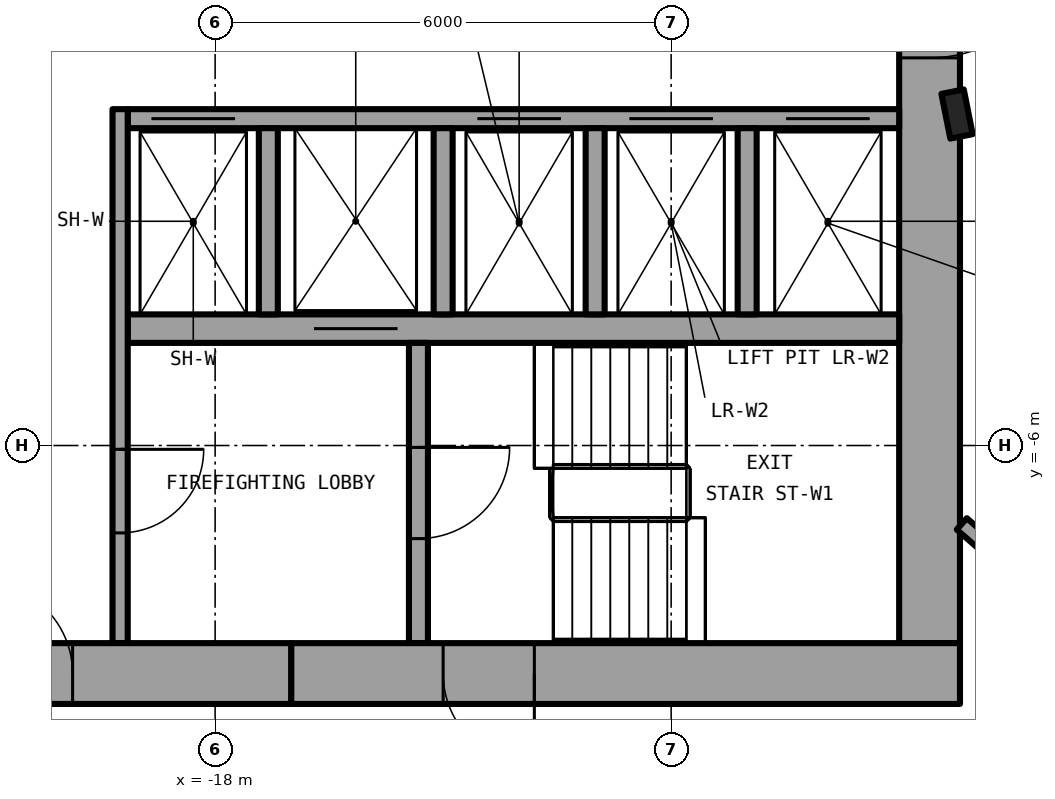
"""IFC4 building model, lengths in metres.
Left out: names, types, materials, properties, quantities, classifications, styles, units other than length and angle.
Written with IfcOpenShell. Run it as: python <this file> out.ifc"""

import sys

from ifc_helpers import new_model, si_unit, direction, frame, frame_2d, origin, origin_2d, place, context, subcontext, project, spatial, rectangle, i_section, extrude, element, fill, save


model = new_model("IFC4")
c1 = context("Model", 3, precision=1e-05, world=origin(), true_north=direction((0.0, 1.0)))
c2 = subcontext(c1, "Body", "Model", "MODEL_VIEW")
j1 = project(units=[si_unit("LENGTHUNIT", "METRE"), si_unit("PLANEANGLEUNIT", "RADIAN")], contexts=[c1])
p1 = place(None, origin())
s1 = spatial("IfcSite", under=j1, at=p1, CompositionType="ELEMENT")
p2 = place(p1, origin())
s2 = spatial("IfcBuilding", under=s1, at=p2, CompositionType="ELEMENT")
p3 = place(p2, origin())
s3 = spatial("IfcBuildingStorey", under=s2, at=p3, CompositionType="ELEMENT", Elevation=0.0)
p4 = place(p3, frame((-8.239, -1.639, -0.5), z_axis=(0.0, 0.0, 1.0), x_axis=(-0.980785280403, -0.195090322016, 0.0)))
e1 = element("IfcColumn", 1, at=p4, inside=s3, PredefinedType="COLUMN", context=c2, shape_type="SweptSolid", body=[
    extrude(i_section(OverallWidth=0.3, OverallDepth=0.6, WebThickness=0.015, FlangeThickness=0.03, FilletRadius=0.027, at=origin_2d()), origin(), (0.0, 0.0, 1.0), 5.9),
])
p5 = place(p3, frame((-8.6, 8.6, 0.0), z_axis=(0.0, 0.0, 1.0), x_axis=(0.0, -1.0, 0.0)))
e2 = element("IfcWall", 2, at=p5, inside=s3, PredefinedType="SHEAR", context=c2, shape_type="SweptSolid", body=[
    extrude(rectangle(XDim=17.2, YDim=0.8, at=frame_2d((8.6, 0.0))), origin(), (0.0, 0.0, 1.0), 5.4),
])
p6 = place(p5, frame((7.7, 0.0, 0.0)))
e3 = element("IfcOpeningElement", 3, at=p6, cuts=e2, PredefinedType="OPENING", context=c2, shape_type="SweptSolid", body=[
    extrude(rectangle(XDim=1.8, YDim=2.3, at=frame_2d((0.9, 1.15))), frame((0.0, 0.41, 0.0), z_axis=(0.0, -1.0, 0.0), x_axis=(1.0, 0.0, 0.0)), (0.0, 0.0, 1.0), 0.82),
])
p7 = place(p3, frame((-9.0, -1.7, 0.0), z_axis=(0.0, 0.0, 1.0), x_axis=(-1.0, 0.0, 0.0)))
e4 = element("IfcWall", 4, at=p7, inside=s3, PredefinedType="SHEAR", context=c2, shape_type="SweptSolid", body=[
    extrude(rectangle(XDim=10.15, YDim=0.25, at=frame_2d((5.075, 0.0))), origin(), (0.0, 0.0, 1.0), 5.4),
])
p8 = place(p7, frame((0.387, 0.0, 0.0)))
e5 = element("IfcOpeningElement", 5, at=p8, cuts=e4, PredefinedType="OPENING", context=c2, shape_type="SweptSolid", body=[
    extrude(rectangle(XDim=1.1, YDim=2.3, at=frame_2d((0.55, 1.15))), frame((0.0, 0.135, 0.0), z_axis=(0.0, -1.0, 0.0), x_axis=(1.0, 0.0, 0.0)), (0.0, 0.0, 1.0), 0.27),
])
p9 = place(p7, frame((2.45, 0.0, 0.0)))
e6 = element("IfcOpeningElement", 6, at=p9, cuts=e4, PredefinedType="OPENING", context=c2, shape_type="SweptSolid", body=[
    extrude(rectangle(XDim=1.1, YDim=2.3, at=frame_2d((0.55, 1.15))), frame((0.0, 0.135, 0.0), z_axis=(0.0, -1.0, 0.0), x_axis=(1.0, 0.0, 0.0)), (0.0, 0.0, 1.0), 0.27),
])
p10 = place(p7, frame((4.45, 0.0, 0.0)))
e7 = element("IfcOpeningElement", 7, at=p10, cuts=e4, PredefinedType="OPENING", context=c2, shape_type="SweptSolid", body=[
    extrude(rectangle(XDim=1.1, YDim=2.3, at=frame_2d((0.55, 1.15))), frame((0.0, 0.135, 0.0), z_axis=(0.0, -1.0, 0.0), x_axis=(1.0, 0.0, 0.0)), (0.0, 0.0, 1.0), 0.27),
])
p11 = place(p7, frame((8.738, 0.0, 0.0)))
e8 = element("IfcOpeningElement", 8, at=p11, cuts=e4, PredefinedType="OPENING", context=c2, shape_type="SweptSolid", body=[
    extrude(rectangle(XDim=1.1, YDim=2.3, at=frame_2d((0.55, 1.15))), frame((0.0, 0.135, 0.0), z_axis=(0.0, -1.0, 0.0), x_axis=(1.0, 0.0, 0.0)), (0.0, 0.0, 1.0), 0.27),
])
p12 = place(p3, frame((-9.0, -4.462, 0.0), z_axis=(0.0, 0.0, 1.0), x_axis=(-1.0, 0.0, 0.0)))
e9 = element("IfcWall", 9, at=p12, inside=s3, PredefinedType="SHEAR", context=c2, shape_type="SweptSolid", body=[
    extrude(rectangle(XDim=10.15, YDim=0.375, at=frame_2d((5.075, 0.0))), origin(), (0.0, 0.0, 1.0), 5.4),
])
p13 = place(p12, frame((6.6, 0.0, 0.0)))
e10 = element("IfcOpeningElement", 10, at=p13, cuts=e9, PredefinedType="OPENING", context=c2, shape_type="SweptSolid", body=[
    extrude(rectangle(XDim=1.1, YDim=2.3, at=frame_2d((0.55, 1.15))), frame((0.0, 0.198, 0.0), z_axis=(0.0, -1.0, 0.0), x_axis=(1.0, 0.0, 0.0)), (0.0, 0.0, 1.0), 0.395),
])
p14 = place(p3, frame((-15.325, -4.65, 0.0), z_axis=(0.0, 0.0, 1.0), x_axis=(0.0, -1.0, 0.0)))
e11 = element("IfcWall", 11, at=p14, inside=s3, PredefinedType="SHEAR", context=c2, shape_type="SweptSolid", body=[
    extrude(rectangle(XDim=3.95, YDim=0.25, at=frame_2d((1.975, 0.0))), origin(), (0.0, 0.0, 1.0), 5.4),
])
p15 = place(p14, frame((1.375, 0.0, 0.0)))
e12 = element("IfcOpeningElement", 12, at=p15, cuts=e11, PredefinedType="OPENING", context=c2, shape_type="SweptSolid", body=[
    extrude(rectangle(XDim=1.2, YDim=2.3, at=frame_2d((0.6, 1.15))), frame((0.0, 0.135, 0.0), z_axis=(0.0, -1.0, 0.0), x_axis=(1.0, 0.0, 0.0)), (0.0, 0.0, 1.0), 0.27),
])
for number, where, z_axis, x_axis in (
    (13, (-15.0, -1.825, 0.0), (0.0, 0.0, 1.0), (0.0, -1.0, 0.0)),
    (14, (-17.3, -1.825, 0.0), (0.0, 0.0, 1.0), (0.0, -1.0, 0.0)),
):
    element("IfcWall", number, at=place(p3, frame(where, z_axis=z_axis, x_axis=x_axis)), inside=s3, PredefinedType="SOLIDWALL", context=c2, shape_type="SweptSolid", body=[
        extrude(rectangle(XDim=2.45, YDim=0.25, at=frame_2d((1.225, 0.0))), origin(), (0.0, 0.0, 1.0), 4.95),
    ])
p16 = place(p3, frame((-19.25, -1.575, 0.0), z_axis=(0.0, 0.0, 1.0), x_axis=(0.0, -1.0, 0.0)))
e15 = element("IfcWall", 15, at=p16, inside=s3, PredefinedType="SOLIDWALL", context=c2, shape_type="SweptSolid", body=[
    extrude(rectangle(XDim=7.025, YDim=0.2, at=frame_2d((3.513, 0.0))), origin(), (0.0, 0.0, 1.0), 4.95),
])
p17 = place(p16, frame((4.475, 0.0, 0.0)))
e16 = element("IfcOpeningElement", 16, at=p17, cuts=e15, PredefinedType="OPENING", context=c2, shape_type="SweptSolid", body=[
    extrude(rectangle(XDim=1.1, YDim=2.3, at=frame_2d((0.55, 1.15))), frame((0.0, 0.11, 0.0), z_axis=(0.0, -1.0, 0.0), x_axis=(1.0, 0.0, 0.0)), (0.0, 0.0, 1.0), 0.22),
])
for number, where, z_axis, x_axis in (
    (17, (-11.0, -1.825, 0.0), (0.0, 0.0, 1.0), (0.0, -1.0, 0.0)),
    (18, (-13.0, -1.825, 0.0), (0.0, 0.0, 1.0), (0.0, -1.0, 0.0)),
):
    element("IfcWall", number, at=place(p3, frame(where, z_axis=z_axis, x_axis=x_axis)), inside=s3, PredefinedType="SOLIDWALL", context=c2, shape_type="SweptSolid", body=[
        extrude(rectangle(XDim=2.45, YDim=0.25, at=frame_2d((1.225, 0.0))), origin(), (0.0, 0.0, 1.0), 4.95),
    ])
p18 = place(p3, frame((-8.2, -9.0, 0.0), z_axis=(0.0, 0.0, 1.0), x_axis=(-1.0, 0.0, 0.0)))
e19 = element("IfcWall", 19, at=p18, inside=s3, PredefinedType="SHEAR", context=c2, shape_type="SweptSolid", body=[
    extrude(rectangle(XDim=8.8, YDim=0.8, at=frame_2d((4.4, 0.0))), origin(), (0.0, 0.0, 1.0), 5.4),
])
p19 = place(p18, frame((5.6, 0.0, 0.0)))
e20 = element("IfcOpeningElement", 20, at=p19, cuts=e19, PredefinedType="OPENING", context=c2, shape_type="SweptSolid", body=[
    extrude(rectangle(XDim=1.2, YDim=2.3, at=frame_2d((0.6, 1.15))), frame((0.0, 0.41, 0.0), z_axis=(0.0, -1.0, 0.0), x_axis=(1.0, 0.0, 0.0)), (0.0, 0.0, 1.0), 0.82),
])
p20 = place(p3, frame((-22.4, -9.0, 0.0), z_axis=(0.0, 0.0, 1.0), x_axis=(1.0, 0.0, 0.0)))
e21 = element("IfcWall", 21, at=p20, inside=s3, PredefinedType="SHEAR", context=c2, shape_type="SweptSolid", body=[
    extrude(rectangle(XDim=5.4, YDim=0.8, at=frame_2d((2.7, 0.0))), origin(), (0.0, 0.0, 1.0), 5.4),
])
p21 = place(p20, frame((1.325, 0.0, 0.0)))
e22 = element("IfcOpeningElement", 22, at=p21, cuts=e21, PredefinedType="OPENING", context=c2, shape_type="SweptSolid", body=[
    extrude(rectangle(XDim=1.2, YDim=2.3, at=frame_2d((0.6, 1.15))), frame((0.0, 0.41, 0.0), z_axis=(0.0, -1.0, 0.0), x_axis=(1.0, 0.0, 0.0)), (0.0, 0.0, 1.0), 0.82),
])
p22 = place(p3, frame((-8.176, -7.031, 0.0), z_axis=(0.0, 0.0, 1.0), x_axis=(0.751755271413, -0.659442197544, 0.0)))
e23 = element("IfcWall", 23, at=p22, inside=s3, PredefinedType="PARTITIONING", context=c2, shape_type="SweptSolid", body=[
    extrude(rectangle(XDim=2.211, YDim=0.2, at=frame_2d((1.105, 0.0))), origin(), (0.0, 0.0, 1.0), 4.95),
])
p23 = place(p8, origin())
e24 = element("IfcDoor", 24, at=p23, inside=s3, OperationType="DOUBLE_DOOR_SLIDING", PredefinedType="DOOR", context=c2, shape_type="SweptSolid", body=[
    extrude(rectangle(XDim=1.1, YDim=2.3, at=frame_2d((0.55, 1.15))), frame((0.0, 0.025, 0.0), z_axis=(0.0, -1.0, 0.0), x_axis=(1.0, 0.0, 0.0)), (0.0, 0.0, 1.0), 0.05),
])
fill(e5, e24)
p24 = place(p9, origin())
e25 = element("IfcDoor", 25, at=p24, inside=s3, OperationType="DOUBLE_DOOR_SLIDING", PredefinedType="DOOR", context=c2, shape_type="SweptSolid", body=[
    extrude(rectangle(XDim=1.1, YDim=2.3, at=frame_2d((0.55, 1.15))), frame((0.0, 0.025, 0.0), z_axis=(0.0, -1.0, 0.0), x_axis=(1.0, 0.0, 0.0)), (0.0, 0.0, 1.0), 0.05),
])
fill(e6, e25)
p25 = place(p10, origin())
e26 = element("IfcDoor", 26, at=p25, inside=s3, OperationType="DOUBLE_DOOR_SLIDING", PredefinedType="DOOR", context=c2, shape_type="SweptSolid", body=[
    extrude(rectangle(XDim=1.1, YDim=2.3, at=frame_2d((0.55, 1.15))), frame((0.0, 0.025, 0.0), z_axis=(0.0, -1.0, 0.0), x_axis=(1.0, 0.0, 0.0)), (0.0, 0.0, 1.0), 0.05),
])
fill(e7, e26)
p26 = place(p13, origin())
e27 = element("IfcDoor", 27, at=p26, inside=s3, OperationType="DOUBLE_DOOR_SLIDING", PredefinedType="DOOR", context=c2, shape_type="SweptSolid", body=[
    extrude(rectangle(XDim=1.1, YDim=2.3, at=frame_2d((0.55, 1.15))), frame((0.0, 0.025, 0.0), z_axis=(0.0, -1.0, 0.0), x_axis=(1.0, 0.0, 0.0)), (0.0, 0.0, 1.0), 0.05),
])
fill(e10, e27)
p27 = place(p11, origin())
e28 = element("IfcDoor", 28, at=p27, inside=s3, OperationType="DOUBLE_DOOR_SLIDING", PredefinedType="DOOR", context=c2, shape_type="SweptSolid", body=[
    extrude(rectangle(XDim=1.1, YDim=2.3, at=frame_2d((0.55, 1.15))), frame((0.0, 0.025, 0.0), z_axis=(0.0, -1.0, 0.0), x_axis=(1.0, 0.0, 0.0)), (0.0, 0.0, 1.0), 0.05),
])
fill(e8, e28)
p28 = place(p15, origin())
e29 = element("IfcDoor", 29, at=p28, inside=s3, OperationType="SINGLE_SWING_LEFT", PredefinedType="DOOR", context=c2, shape_type="SweptSolid", body=[
    extrude(rectangle(XDim=1.2, YDim=2.3, at=frame_2d((0.6, 1.15))), frame((0.0, 0.025, 0.0), z_axis=(0.0, -1.0, 0.0), x_axis=(1.0, 0.0, 0.0)), (0.0, 0.0, 1.0), 0.05),
])
fill(e12, e29)
p29 = place(p17, origin())
e30 = element("IfcDoor", 30, at=p29, inside=s3, OperationType="SINGLE_SWING_LEFT", PredefinedType="DOOR", context=c2, shape_type="SweptSolid", body=[
    extrude(rectangle(XDim=1.1, YDim=2.3, at=frame_2d((0.55, 1.15))), frame((0.0, 0.025, 0.0), z_axis=(0.0, -1.0, 0.0), x_axis=(1.0, 0.0, 0.0)), (0.0, 0.0, 1.0), 0.05),
])
fill(e16, e30)
p30 = place(p21, origin())
e31 = element("IfcDoor", 31, at=p30, inside=s3, OperationType="SINGLE_SWING_RIGHT", PredefinedType="DOOR", context=c2, shape_type="SweptSolid", body=[
    extrude(rectangle(XDim=1.2, YDim=2.3, at=frame_2d((0.6, 1.15))), frame((0.0, 0.025, 0.0), z_axis=(0.0, -1.0, 0.0), x_axis=(1.0, 0.0, 0.0)), (0.0, 0.0, 1.0), 0.05),
])
fill(e22, e31)
p31 = place(p6, origin())
e32 = element("IfcDoor", 32, at=p31, inside=s3, OperationType="SINGLE_SWING_LEFT", PredefinedType="DOOR", context=c2, shape_type="SweptSolid", body=[
    extrude(rectangle(XDim=1.8, YDim=2.3, at=frame_2d((0.9, 1.15))), frame((0.0, 0.025, 0.0), z_axis=(0.0, -1.0, 0.0), x_axis=(1.0, 0.0, 0.0)), (0.0, 0.0, 1.0), 0.05),
])
fill(e3, e32)
p32 = place(p19, origin())
e33 = element("IfcDoor", 33, at=p32, inside=s3, OperationType="SINGLE_SWING_LEFT", PredefinedType="DOOR", context=c2, shape_type="SweptSolid", body=[
    extrude(rectangle(XDim=1.2, YDim=2.3, at=frame_2d((0.6, 1.15))), frame((0.0, 0.025, 0.0), z_axis=(0.0, -1.0, 0.0), x_axis=(1.0, 0.0, 0.0)), (0.0, 0.0, 1.0), 0.05),
])
fill(e20, e33)
save(model, sys.argv[1])
